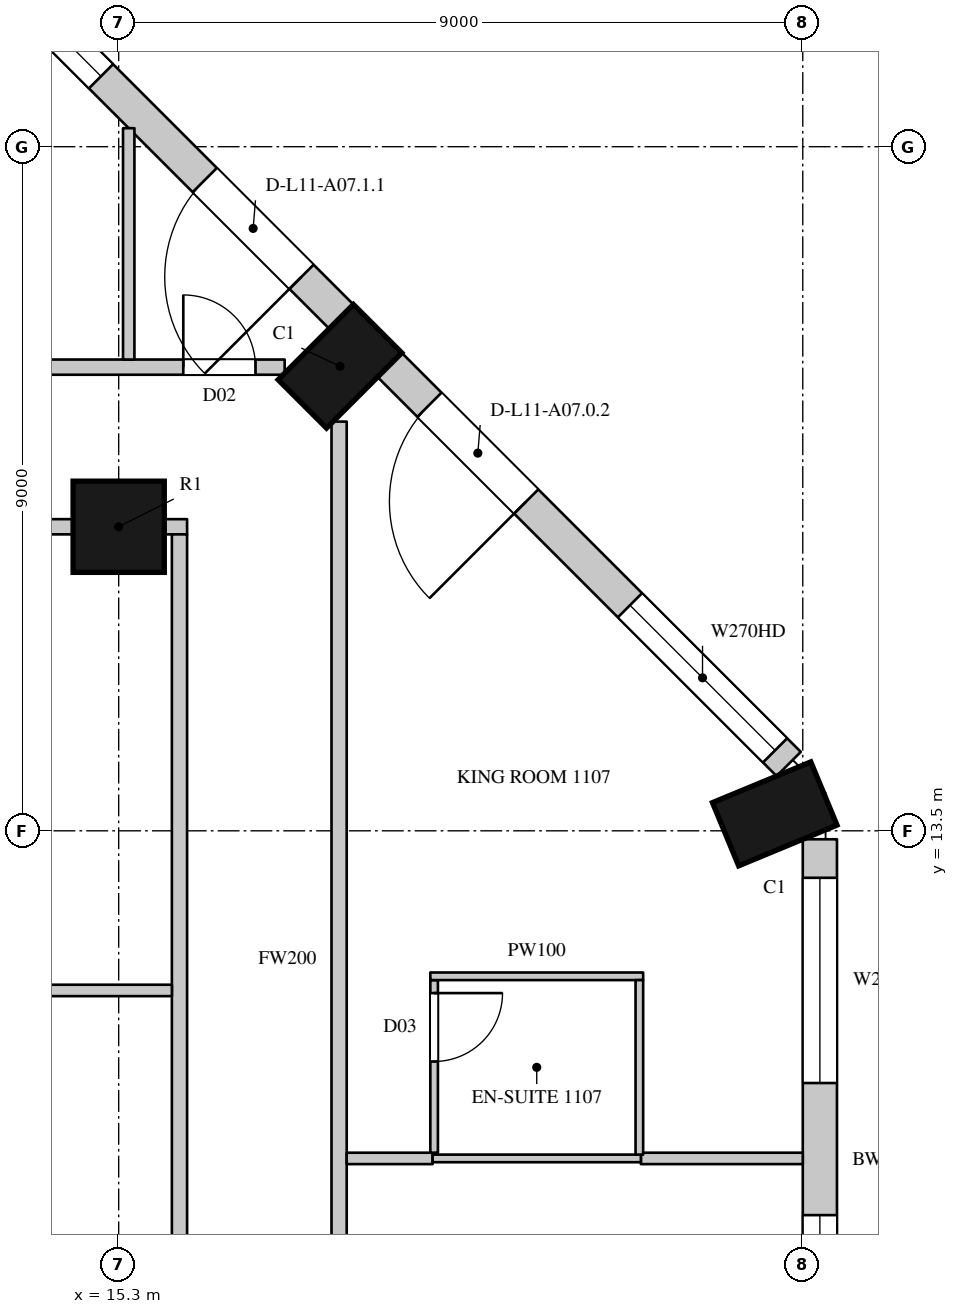
"""IFC4 building model, lengths in metres.
Left out: names, types, materials, properties, quantities, classifications, styles, units other than length and angle.
Written with IfcOpenShell. Run it as: python <this file> out.ifc"""

import sys

from ifc_helpers import new_model, si_unit, direction, frame, frame_2d, origin, origin_2d, place, context, subcontext, project, spatial, rectangle, circle, extrude, element, fill, save


model = new_model("IFC4")
c1 = context("Model", 3, precision=1e-05, world=origin(), true_north=direction((0.0, 1.0)))
c2 = subcontext(c1, "Body", "Model", "MODEL_VIEW")
j1 = project(units=[si_unit("LENGTHUNIT", "METRE"), si_unit("PLANEANGLEUNIT", "RADIAN")], contexts=[c1])
p1 = place(None, origin())
s1 = spatial("IfcSite", under=j1, at=p1, CompositionType="ELEMENT")
p2 = place(p1, origin())
s2 = spatial("IfcBuilding", under=s1, at=p2, CompositionType="ELEMENT")
p3 = place(p2, frame((0.0, 0.0, 69.9)))
s3 = spatial("IfcBuildingStorey", under=s2, at=p3, CompositionType="ELEMENT", Elevation=69.9)
for number, where, z_axis, x_axis in (
    (1, (23.931, 13.723, 0.0), (0.0, 0.0, 1.0), (-0.383, 0.924, 0.0)),
    (2, (18.211, 19.611, 0.0), (0.0, 0.0, 1.0), (-0.707, 0.707, 0.0)),
):
    element("IfcColumn", number, at=place(p3, frame(where, z_axis=z_axis, x_axis=x_axis)), inside=s3, PredefinedType="COLUMN", context=c2, shape_type="SweptSolid", body=[
        extrude(rectangle(XDim=0.9, YDim=1.4, at=origin_2d()), origin(), (0.0, 0.0, 1.0), 3.6),
    ])
p4 = place(p3, frame((15.3, 17.5, 0.0), z_axis=(0.0, 0.0, 1.0), x_axis=(1.0, 0.0, 0.0)))
e3 = element("IfcColumn", 3, at=p4, inside=s3, PredefinedType="COLUMN", context=c2, shape_type="SweptSolid", body=[
    extrude(circle(Radius=0.6, at=origin_2d()), origin(), (0.0, 0.0, 1.0), 3.6),
])
p5 = place(p3, frame((24.525, 4.95, 0.0), z_axis=(0.0, 0.0, 1.0), x_axis=(0.0, 1.0, 0.0)))
e4 = element("IfcWall", 4, at=p5, inside=s3, PredefinedType="SOLIDWALL", context=c2, shape_type="SweptSolid", body=[
    extrude(rectangle(XDim=8.439, YDim=0.45, at=frame_2d((4.219, 0.0))), origin(), (0.0, 0.0, 1.0), 3.3),
])
p6 = place(p5, frame((0.294, 0.0, 0.0)))
e5 = element("IfcOpeningElement", 5, at=p6, cuts=e4, PredefinedType="OPENING", context=c2, shape_type="SweptSolid", body=[
    extrude(rectangle(XDim=1.8, YDim=2.4, at=frame_2d((0.9, 1.2))), frame((0.0, 0.235, 0.0), z_axis=(0.0, -1.0, 0.0), x_axis=(1.0, 0.0, 0.0)), (0.0, 0.0, 1.0), 0.47),
])
p7 = place(p5, frame((2.294, 0.0, 1.05)))
e6 = element("IfcOpeningElement", 6, at=p7, cuts=e4, PredefinedType="OPENING", context=c2, shape_type="SweptSolid", body=[
    extrude(rectangle(XDim=1.2, YDim=2.0, at=frame_2d((0.6, 1.0))), frame((0.0, 0.235, 0.0), z_axis=(0.0, -1.0, 0.0), x_axis=(1.0, 0.0, 0.0)), (0.0, 0.0, 1.0), 0.47),
])
p8 = place(p5, frame((5.232, 0.0, 1.05)))
e7 = element("IfcOpeningElement", 7, at=p8, cuts=e4, PredefinedType="OPENING", context=c2, shape_type="SweptSolid", body=[
    extrude(rectangle(XDim=2.7, YDim=2.0, at=frame_2d((1.35, 1.0))), frame((0.0, 0.235, 0.0), z_axis=(0.0, -1.0, 0.0), x_axis=(1.0, 0.0, 0.0)), (0.0, 0.0, 1.0), 0.47),
])
p9 = place(p3, frame((24.115, 14.379, 0.0), z_axis=(0.0, 0.0, 1.0), x_axis=(-0.707106781187, 0.707106781187, 0.0)))
e8 = element("IfcWall", 8, at=p9, inside=s3, PredefinedType="SOLIDWALL", context=c2, shape_type="SweptSolid", body=[
    extrude(rectangle(XDim=7.424, YDim=0.45, at=frame_2d((3.712, 0.0))), origin(), (0.0, 0.0, 1.0), 3.3),
])
p10 = place(p9, frame((0.253, 0.0, 1.05)))
e9 = element("IfcOpeningElement", 9, at=p10, cuts=e8, PredefinedType="OPENING", context=c2, shape_type="SweptSolid", body=[
    extrude(rectangle(XDim=2.7, YDim=2.0, at=frame_2d((1.35, 1.0))), frame((0.0, 0.235, 0.0), z_axis=(0.0, -1.0, 0.0), x_axis=(1.0, 0.0, 0.0)), (0.0, 0.0, 1.0), 0.47),
])
p11 = place(p9, frame((4.884, 0.0, 0.0)))
e10 = element("IfcOpeningElement", 10, at=p11, cuts=e8, PredefinedType="OPENING", context=c2, shape_type="SweptSolid", body=[
    extrude(rectangle(XDim=1.8, YDim=2.4, at=frame_2d((0.9, 1.2))), frame((0.0, 0.235, 0.0), z_axis=(0.0, -1.0, 0.0), x_axis=(1.0, 0.0, 0.0)), (0.0, 0.0, 1.0), 0.47),
])
p12 = place(p3, frame((18.229, 20.265, 0.0), z_axis=(0.0, 0.0, 1.0), x_axis=(-0.707106781187, 0.707106781187, 0.0)))
e11 = element("IfcWall", 11, at=p12, inside=s3, PredefinedType="SOLIDWALL", context=c2, shape_type="SweptSolid", body=[
    extrude(rectangle(XDim=7.424, YDim=0.45, at=frame_2d((3.712, 0.0))), origin(), (0.0, 0.0, 1.0), 3.3),
])
p13 = place(p12, frame((0.74, 0.0, 0.0)))
e12 = element("IfcOpeningElement", 12, at=p13, cuts=e11, PredefinedType="OPENING", context=c2, shape_type="SweptSolid", body=[
    extrude(rectangle(XDim=1.8, YDim=2.4, at=frame_2d((0.9, 1.2))), frame((0.0, 0.235, 0.0), z_axis=(0.0, -1.0, 0.0), x_axis=(1.0, 0.0, 0.0)), (0.0, 0.0, 1.0), 0.47),
])
p14 = place(p12, frame((4.471, 0.0, 1.05)))
e13 = element("IfcOpeningElement", 13, at=p14, cuts=e11, PredefinedType="OPENING", context=c2, shape_type="SweptSolid", body=[
    extrude(rectangle(XDim=2.7, YDim=2.0, at=frame_2d((1.35, 1.0))), frame((0.0, 0.235, 0.0), z_axis=(0.0, -1.0, 0.0), x_axis=(1.0, 0.0, 0.0)), (0.0, 0.0, 1.0), 0.47),
])
p15 = place(p3, frame((23.15, 16.864, 0.0), z_axis=(0.0, 0.0, 1.0), x_axis=(-0.707106781187, 0.707106781187, 0.0)))
e14 = element("IfcWall", 14, at=p15, inside=s3, PredefinedType="SOLIDWALL", context=c2, shape_type="SweptSolid", body=[
    extrude(rectangle(XDim=1.445, YDim=0.45, at=frame_2d((0.722, 0.0))), origin(), (0.0, 0.0, 1.0), 0.6),
])
p16 = place(p3, frame((19.937, 20.078, 0.0), z_axis=(0.0, 0.0, 1.0), x_axis=(-0.707106781187, 0.707106781187, 0.0)))
e15 = element("IfcWall", 15, at=p16, inside=s3, PredefinedType="SOLIDWALL", context=c2, shape_type="SweptSolid", body=[
    extrude(rectangle(XDim=1.781, YDim=0.45, at=frame_2d((0.89, 0.0))), origin(), (0.0, 0.0, 1.0), 0.6),
])
p17 = place(p3, frame((16.486, 23.529, 0.0), z_axis=(0.0, 0.0, 1.0), x_axis=(-0.707022305137, 0.707191247145, 0.0)))
e16 = element("IfcWall", 16, at=p17, inside=s3, PredefinedType="SOLIDWALL", context=c2, shape_type="SweptSolid", body=[
    extrude(rectangle(XDim=1.445, YDim=0.45, at=frame_2d((0.723, 0.0))), origin(), (0.0, 0.0, 1.0), 0.6),
])
p18 = place(p3, frame((-20.7, 19.6, 0.0), z_axis=(0.0, 0.0, 1.0), x_axis=(1.0, 0.0, 0.0)))
e17 = element("IfcWall", 17, at=p18, inside=s3, PredefinedType="PARTITIONING", context=c2, shape_type="SweptSolid", body=[
    extrude(rectangle(XDim=38.184, YDim=0.2, at=frame_2d((19.092, 0.0))), origin(), (0.0, 0.0, 1.0), 3.3),
])
p19 = place(p18, frame((3.15, 0.0, 0.0)))
e18 = element("IfcOpeningElement", 18, at=p19, cuts=e17, PredefinedType="OPENING", context=c2, shape_type="SweptSolid", body=[
    extrude(rectangle(XDim=0.95, YDim=2.2, at=frame_2d((0.475, 1.1))), frame((0.0, 0.11, 0.0), z_axis=(0.0, -1.0, 0.0), x_axis=(1.0, 0.0, 0.0)), (0.0, 0.0, 1.0), 0.22),
])
p20 = place(p18, frame((13.9, 0.0, 0.0)))
e19 = element("IfcOpeningElement", 19, at=p20, cuts=e17, PredefinedType="OPENING", context=c2, shape_type="SweptSolid", body=[
    extrude(rectangle(XDim=0.95, YDim=2.2, at=frame_2d((0.475, 1.1))), frame((0.0, 0.11, 0.0), z_axis=(0.0, -1.0, 0.0), x_axis=(1.0, 0.0, 0.0)), (0.0, 0.0, 1.0), 0.22),
])
p21 = place(p18, frame((21.15, 0.0, 0.0)))
e20 = element("IfcOpeningElement", 20, at=p21, cuts=e17, PredefinedType="OPENING", context=c2, shape_type="SweptSolid", body=[
    extrude(rectangle(XDim=0.95, YDim=2.2, at=frame_2d((0.475, 1.1))), frame((0.0, 0.11, 0.0), z_axis=(0.0, -1.0, 0.0), x_axis=(1.0, 0.0, 0.0)), (0.0, 0.0, 1.0), 0.22),
])
p22 = place(p18, frame((31.9, 0.0, 0.0)))
e21 = element("IfcOpeningElement", 21, at=p22, cuts=e17, PredefinedType="OPENING", context=c2, shape_type="SweptSolid", body=[
    extrude(rectangle(XDim=0.95, YDim=2.2, at=frame_2d((0.475, 1.1))), frame((0.0, 0.11, 0.0), z_axis=(0.0, -1.0, 0.0), x_axis=(1.0, 0.0, 0.0)), (0.0, 0.0, 1.0), 0.22),
])
p23 = place(p18, frame((36.85, 0.0, 0.0)))
e22 = element("IfcOpeningElement", 22, at=p23, cuts=e17, PredefinedType="OPENING", context=c2, shape_type="SweptSolid", body=[
    extrude(rectangle(XDim=0.95, YDim=2.2, at=frame_2d((0.475, 1.1))), frame((0.0, 0.11, 0.0), z_axis=(0.0, -1.0, 0.0), x_axis=(1.0, 0.0, 0.0)), (0.0, 0.0, 1.0), 0.22),
])
p24 = place(p3, frame((6.9, 17.5, 0.0), z_axis=(0.0, 0.0, 1.0), x_axis=(1.0, 0.0, 0.0)))
e23 = element("IfcWall", 23, at=p24, inside=s3, PredefinedType="PARTITIONING", context=c2, shape_type="SweptSolid", body=[
    extrude(rectangle(XDim=7.8, YDim=0.2, at=frame_2d((3.9, 0.0))), origin(), (0.0, 0.0, 1.0), 2.75),
])
p25 = place(p24, frame((3.45, 0.0, 0.0)))
e24 = element("IfcOpeningElement", 24, at=p25, cuts=e23, PredefinedType="OPENING", context=c2, shape_type="SweptSolid", body=[
    extrude(rectangle(XDim=0.95, YDim=2.2, at=frame_2d((0.475, 1.1))), frame((0.0, 0.11, 0.0), z_axis=(0.0, -1.0, 0.0), x_axis=(1.0, 0.0, 0.0)), (0.0, 0.0, 1.0), 0.22),
])
p26 = place(p3, frame((15.9, 17.5, 0.0), z_axis=(0.0, 0.0, 1.0), x_axis=(1.0, 0.0, 0.0)))
e25 = element("IfcWall", 25, at=p26, inside=s3, PredefinedType="PARTITIONING", context=c2, shape_type="SweptSolid", body=[
    extrude(rectangle(XDim=0.3, YDim=0.2, at=frame_2d((0.15, 0.0))), origin(), (0.0, 0.0, 1.0), 3.3),
])
p27 = place(p3, frame((16.1, 6.825, 0.0), z_axis=(0.0, 0.0, 1.0), x_axis=(0.0, 1.0, 0.0)))
e26 = element("IfcWall", 26, at=p27, inside=s3, PredefinedType="PARTITIONING", context=c2, shape_type="SweptSolid", body=[
    extrude(rectangle(XDim=10.575, YDim=0.2, at=frame_2d((5.288, 0.0))), origin(), (0.0, 0.0, 1.0), 3.3),
])
p28 = place(p3, frame((18.2, 4.75, 0.0), z_axis=(0.0, 0.0, 1.0), x_axis=(0.0, 1.0, 0.0)))
e27 = element("IfcWall", 27, at=p28, inside=s3, PredefinedType="PARTITIONING", context=c2, shape_type="SweptSolid", body=[
    extrude(rectangle(XDim=14.134, YDim=0.2, at=frame_2d((7.067, 0.0))), origin(), (0.0, 0.0, 1.0), 3.3),
])
p29 = place(p28, frame((1.7, 0.0, 0.0)))
e28 = element("IfcOpeningElement", 28, at=p29, cuts=e27, PredefinedType="OPENING", context=c2, shape_type="SweptSolid", body=[
    extrude(rectangle(XDim=0.9, YDim=2.2, at=frame_2d((0.45, 1.1))), frame((0.0, 0.11, 0.0), z_axis=(0.0, -1.0, 0.0), x_axis=(1.0, 0.0, 0.0)), (0.0, 0.0, 1.0), 0.22),
])
p30 = place(p3, frame((10.4, 11.4, 0.0), z_axis=(0.0, 0.0, 1.0), x_axis=(1.0, 0.0, 0.0)))
e29 = element("IfcWall", 29, at=p30, inside=s3, PredefinedType="PARTITIONING", context=c2, shape_type="SweptSolid", body=[
    extrude(rectangle(XDim=5.6, YDim=0.15, at=frame_2d((2.8, 0.0))), origin(), (0.0, 0.0, 1.0), 3.3),
])
p31 = place(p3, frame((15.432, 19.7, 0.0), z_axis=(0.0, 0.0, 1.0), x_axis=(0.0, 1.0, 0.0)))
e30 = element("IfcWall", 30, at=p31, inside=s3, PredefinedType="PARTITIONING", context=c2, shape_type="SweptSolid", body=[
    extrude(rectangle(XDim=3.044, YDim=0.15, at=frame_2d((1.522, 0.0))), origin(), (0.0, 0.0, 1.0), 3.3),
])
p32 = place(p3, frame((18.3, 9.19, 0.0), z_axis=(0.0, 0.0, 1.0), x_axis=(1.0, 0.0, 0.0)))
e31 = element("IfcWall", 31, at=p32, inside=s3, PredefinedType="PARTITIONING", context=c2, shape_type="SweptSolid", body=[
    extrude(rectangle(XDim=1.13, YDim=0.15, at=frame_2d((0.565, 0.0))), origin(), (0.0, 0.0, 1.0), 2.65),
])
p33 = place(p3, frame((22.17, 9.19, 0.0), z_axis=(0.0, 0.0, 1.0), x_axis=(1.0, 0.0, 0.0)))
e32 = element("IfcWall", 32, at=p33, inside=s3, PredefinedType="PARTITIONING", context=c2, shape_type="SweptSolid", body=[
    extrude(rectangle(XDim=2.13, YDim=0.15, at=frame_2d((1.065, 0.0))), origin(), (0.0, 0.0, 1.0), 2.65),
])
p34 = place(p3, frame((19.43, 9.19, 0.0), z_axis=(0.0, 0.0, 1.0), x_axis=(1.0, 0.0, 0.0)))
e33 = element("IfcWall", 33, at=p34, inside=s3, PredefinedType="PARTITIONING", context=c2, shape_type="SweptSolid", body=[
    extrude(rectangle(XDim=2.74, YDim=0.1, at=frame_2d((1.37, 0.0))), origin(), (0.0, 0.0, 1.0), 2.65),
])
p35 = place(p3, frame((19.45, 9.265, 0.0), z_axis=(0.0, 0.0, 1.0), x_axis=(0.0, 1.0, 0.0)))
e34 = element("IfcWall", 34, at=p35, inside=s3, PredefinedType="PARTITIONING", context=c2, shape_type="SweptSolid", body=[
    extrude(rectangle(XDim=2.271, YDim=0.1, at=frame_2d((1.135, 0.0))), origin(), (0.0, 0.0, 1.0), 3.3),
])
p36 = place(p35, frame((1.2, 0.0, 0.0)))
e35 = element("IfcOpeningElement", 35, at=p36, cuts=e34, PredefinedType="OPENING", context=c2, shape_type="SweptSolid", body=[
    extrude(rectangle(XDim=0.9, YDim=2.2, at=frame_2d((0.45, 1.1))), frame((0.0, 0.06, 0.0), z_axis=(0.0, -1.0, 0.0), x_axis=(1.0, 0.0, 0.0)), (0.0, 0.0, 1.0), 0.12),
])
p37 = place(p3, frame((19.4, 11.586, 0.0), z_axis=(0.0, 0.0, 1.0), x_axis=(1.0, 0.0, 0.0)))
e36 = element("IfcWall", 36, at=p37, inside=s3, PredefinedType="PARTITIONING", context=c2, shape_type="SweptSolid", body=[
    extrude(rectangle(XDim=2.8, YDim=0.1, at=frame_2d((1.4, 0.0))), origin(), (0.0, 0.0, 1.0), 3.3),
])
p38 = place(p3, frame((22.15, 9.24, 0.0), z_axis=(0.0, 0.0, 1.0), x_axis=(0.0, 1.0, 0.0)))
e37 = element("IfcWall", 37, at=p38, inside=s3, PredefinedType="PARTITIONING", context=c2, shape_type="SweptSolid", body=[
    extrude(rectangle(XDim=2.296, YDim=0.1, at=frame_2d((1.148, 0.0))), origin(), (0.0, 0.0, 1.0), 3.3),
])
p39 = place(p7, origin())
e38 = element("IfcWindow", 38, at=p39, inside=s3, PartitioningType="SINGLE_PANEL", PredefinedType="WINDOW", context=c2, shape_type="SweptSolid", body=[
    extrude(rectangle(XDim=1.2, YDim=2.0, at=frame_2d((0.6, 1.0))), frame((0.0, 0.135, 0.0), z_axis=(0.0, -1.0, 0.0), x_axis=(1.0, 0.0, 0.0)), (0.0, 0.0, 1.0), 0.06),
])
fill(e6, e38)
p40 = place(p8, origin())
e39 = element("IfcWindow", 39, at=p40, inside=s3, PartitioningType="SINGLE_PANEL", PredefinedType="WINDOW", context=c2, shape_type="SweptSolid", body=[
    extrude(rectangle(XDim=2.7, YDim=2.0, at=frame_2d((1.35, 1.0))), frame((0.0, 0.135, 0.0), z_axis=(0.0, -1.0, 0.0), x_axis=(1.0, 0.0, 0.0)), (0.0, 0.0, 1.0), 0.06),
])
fill(e7, e39)
p41 = place(p10, origin())
e40 = element("IfcWindow", 40, at=p41, inside=s3, PartitioningType="SINGLE_PANEL", PredefinedType="WINDOW", context=c2, shape_type="SweptSolid", body=[
    extrude(rectangle(XDim=2.7, YDim=2.0, at=frame_2d((1.35, 1.0))), frame((0.0, 0.135, 0.0), z_axis=(0.0, -1.0, 0.0), x_axis=(1.0, 0.0, 0.0)), (0.0, 0.0, 1.0), 0.06),
])
fill(e9, e40)
p42 = place(p11, origin())
e41 = element("IfcDoor", 41, at=p42, inside=s3, OperationType="SLIDING_TO_LEFT", PredefinedType="DOOR", context=c2, shape_type="SweptSolid", body=[
    extrude(rectangle(XDim=1.8, YDim=2.4, at=frame_2d((0.9, 1.2))), frame((0.0, 0.13, 0.0), z_axis=(0.0, -1.0, 0.0), x_axis=(1.0, 0.0, 0.0)), (0.0, 0.0, 1.0), 0.05),
])
fill(e10, e41)
p43 = place(p13, origin())
e42 = element("IfcDoor", 42, at=p43, inside=s3, OperationType="SLIDING_TO_LEFT", PredefinedType="DOOR", context=c2, shape_type="SweptSolid", body=[
    extrude(rectangle(XDim=1.8, YDim=2.4, at=frame_2d((0.9, 1.2))), frame((0.0, 0.13, 0.0), z_axis=(0.0, -1.0, 0.0), x_axis=(1.0, 0.0, 0.0)), (0.0, 0.0, 1.0), 0.05),
])
fill(e12, e42)
p44 = place(p14, origin())
e43 = element("IfcWindow", 43, at=p44, inside=s3, PartitioningType="SINGLE_PANEL", PredefinedType="WINDOW", context=c2, shape_type="SweptSolid", body=[
    extrude(rectangle(XDim=2.7, YDim=2.0, at=frame_2d((1.35, 1.0))), frame((0.0, 0.135, 0.0), z_axis=(0.0, -1.0, 0.0), x_axis=(1.0, 0.0, 0.0)), (0.0, 0.0, 1.0), 0.06),
])
fill(e13, e43)
p45 = place(p23, origin())
e44 = element("IfcDoor", 44, at=p45, inside=s3, OperationType="SINGLE_SWING_LEFT", PredefinedType="DOOR", context=c2, shape_type="SweptSolid", body=[
    extrude(rectangle(XDim=0.95, YDim=2.2, at=frame_2d((0.475, 1.1))), frame((0.0, 0.025, 0.0), z_axis=(0.0, -1.0, 0.0), x_axis=(1.0, 0.0, 0.0)), (0.0, 0.0, 1.0), 0.05),
])
fill(e22, e44)
p46 = place(p36, origin())
e45 = element("IfcDoor", 45, at=p46, inside=s3, OperationType="SINGLE_SWING_LEFT", PredefinedType="DOOR", context=c2, shape_type="SweptSolid", body=[
    extrude(rectangle(XDim=0.9, YDim=2.2, at=frame_2d((0.45, 1.1))), frame((0.0, 0.025, 0.0), z_axis=(0.0, -1.0, 0.0), x_axis=(1.0, 0.0, 0.0)), (0.0, 0.0, 1.0), 0.05),
])
fill(e35, e45)
save(model, sys.argv[1])
